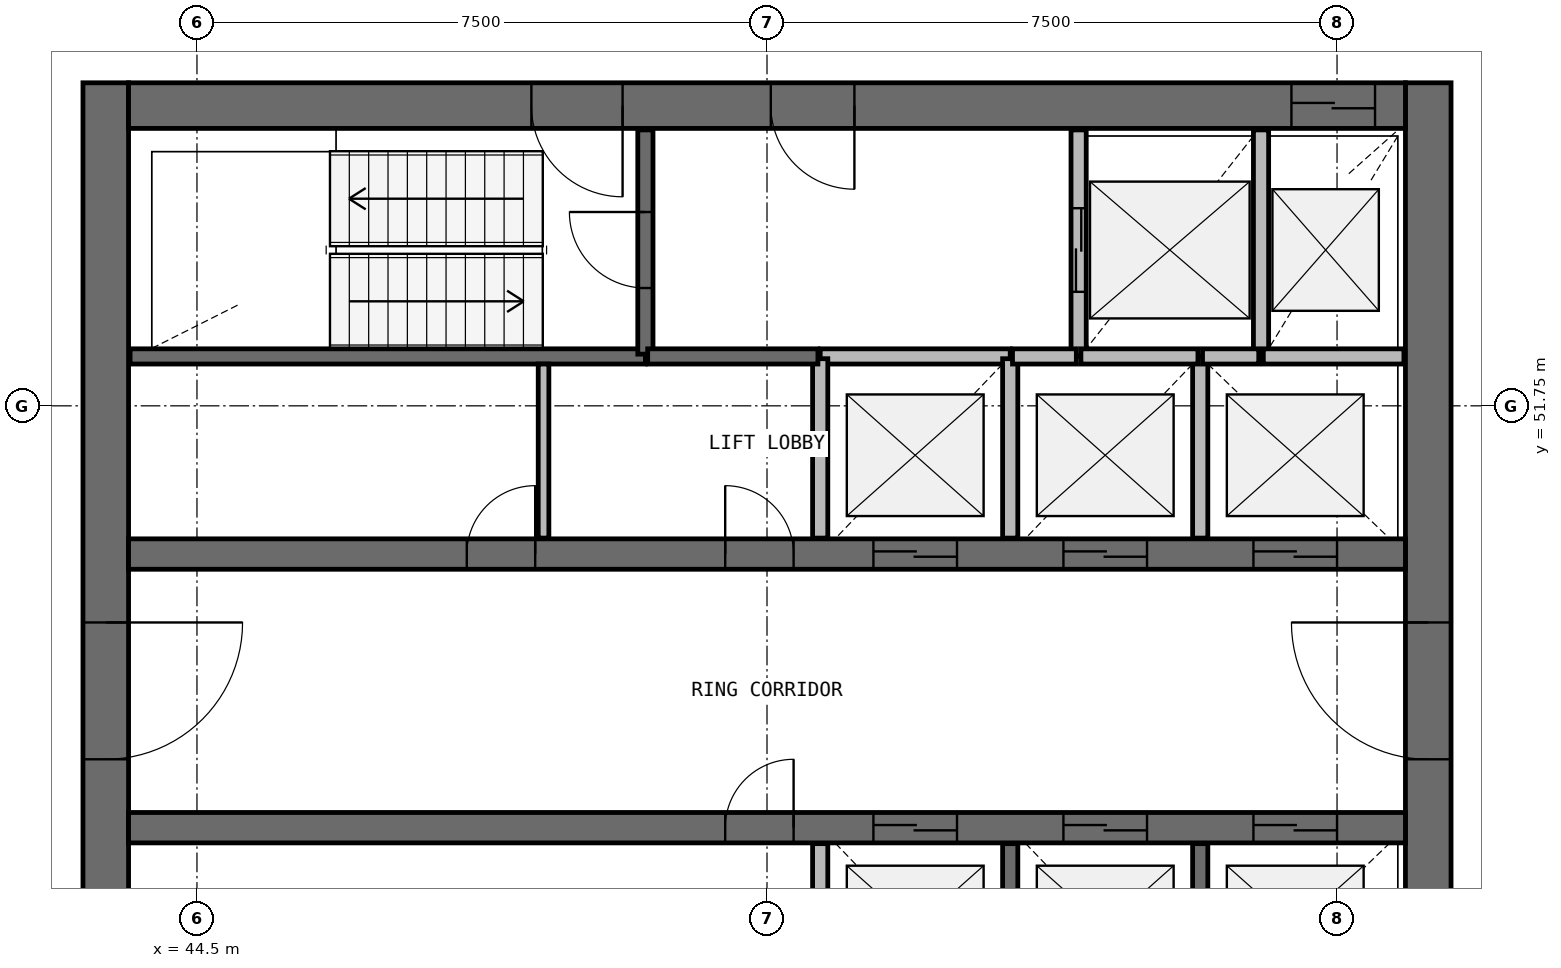
"""IFC4 building model, lengths in metres.
Left out: names, types, materials, properties, quantities, classifications, styles, units other than length and angle.
Written with IfcOpenShell. Run it as: python <this file> out.ifc"""

import sys

from ifc_helpers import new_model, si_unit, direction, frame, frame_2d, origin, place, context, subcontext, project, spatial, rectangle, extrude, source, transform, mapped, element, fill, save


model = new_model("IFC4")
c1 = context("Model", 3, precision=1e-05, world=origin(), true_north=direction((0.0, 1.0)))
c2 = subcontext(c1, "Body", "Model", "MODEL_VIEW")
j1 = project(units=[si_unit("LENGTHUNIT", "METRE"), si_unit("PLANEANGLEUNIT", "RADIAN")], contexts=[c1])
p1 = place(None, origin())
s1 = spatial("IfcSite", under=j1, at=p1, CompositionType="ELEMENT")
p2 = place(p1, origin())
s2 = spatial("IfcBuilding", under=s1, at=p2, CompositionType="ELEMENT")
p3 = place(p2, frame((0.0, 0.0, 257.9)))
s3 = spatial("IfcBuildingStorey", under=s2, at=p3, CompositionType="ELEMENT", Elevation=257.9)
p4 = place(p3, frame((60.7, 40.0, 0.0), z_axis=(0.0, 0.0, 1.0), x_axis=(0.0, 1.0, 0.0)))
e1 = element("IfcWall", 1, at=p4, inside=s3, PredefinedType="SHEAR", context=c2, shape_type="SweptSolid", body=[
    extrude(rectangle(XDim=16.0, YDim=0.6, at=frame_2d((8.0, 0.0))), origin(), (0.0, 0.0, 1.0), 3.9),
])
p5 = place(p4, frame((7.1, 0.0, 0.0)))
e2 = element("IfcOpeningElement", 2, at=p5, cuts=e1, PredefinedType="OPENING", context=c2, shape_type="SweptSolid", body=[
    extrude(rectangle(XDim=1.8, YDim=2.1, at=frame_2d((0.9, 1.05))), frame((0.0, 0.31, 0.0), z_axis=(0.0, -1.0, 0.0), x_axis=(1.0, 0.0, 0.0)), (0.0, 0.0, 1.0), 0.62),
])
p6 = place(p3, frame((43.3, 56.0, 0.0), z_axis=(0.0, 0.0, 1.0), x_axis=(0.0, -1.0, 0.0)))
e3 = element("IfcWall", 3, at=p6, inside=s3, PredefinedType="SHEAR", context=c2, shape_type="SweptSolid", body=[
    extrude(rectangle(XDim=16.0, YDim=0.6, at=frame_2d((8.0, 0.0))), origin(), (0.0, 0.0, 1.0), 3.9),
])
p7 = place(p6, frame((7.1, 0.0, 0.0)))
e4 = element("IfcOpeningElement", 4, at=p7, cuts=e3, PredefinedType="OPENING", context=c2, shape_type="SweptSolid", body=[
    extrude(rectangle(XDim=1.8, YDim=2.1, at=frame_2d((0.9, 1.05))), frame((0.0, 0.31, 0.0), z_axis=(0.0, -1.0, 0.0), x_axis=(1.0, 0.0, 0.0)), (0.0, 0.0, 1.0), 0.62),
])
p8 = place(p3, frame((60.4, 55.7, 0.0), z_axis=(0.0, 0.0, 1.0), x_axis=(-1.0, 0.0, 0.0)))
e5 = element("IfcWall", 5, at=p8, inside=s3, PredefinedType="SHEAR", context=c2, shape_type="SweptSolid", body=[
    extrude(rectangle(XDim=16.8, YDim=0.6, at=frame_2d((8.4, 0.0))), origin(), (0.0, 0.0, 1.0), 3.9),
])
p9 = place(p8, frame((0.4, 0.0, 0.0)))
e6 = element("IfcOpeningElement", 6, at=p9, cuts=e5, PredefinedType="OPENING", context=c2, shape_type="SweptSolid", body=[
    extrude(rectangle(XDim=1.1, YDim=2.1, at=frame_2d((0.55, 1.05))), frame((0.0, 0.31, 0.0), z_axis=(0.0, -1.0, 0.0), x_axis=(1.0, 0.0, 0.0)), (0.0, 0.0, 1.0), 0.62),
])
p10 = place(p8, frame((10.3, 0.0, 0.0)))
e7 = element("IfcOpeningElement", 7, at=p10, cuts=e5, PredefinedType="OPENING", context=c2, shape_type="SweptSolid", body=[
    extrude(rectangle(XDim=1.2, YDim=2.1, at=frame_2d((0.6, 1.05))), frame((0.0, 0.31, 0.0), z_axis=(0.0, -1.0, 0.0), x_axis=(1.0, 0.0, 0.0)), (0.0, 0.0, 1.0), 0.62),
])
p11 = place(p8, frame((7.25, 0.0, 0.0)))
e8 = element("IfcOpeningElement", 8, at=p11, cuts=e5, PredefinedType="OPENING", context=c2, shape_type="SweptSolid", body=[
    extrude(rectangle(XDim=1.1, YDim=2.1, at=frame_2d((0.55, 1.05))), frame((0.0, 0.31, 0.0), z_axis=(0.0, -1.0, 0.0), x_axis=(1.0, 0.0, 0.0)), (0.0, 0.0, 1.0), 0.62),
])
p12 = place(p3, frame((43.6, 49.8, 0.0), z_axis=(0.0, 0.0, 1.0), x_axis=(1.0, 0.0, 0.0)))
e9 = element("IfcWall", 9, at=p12, inside=s3, PredefinedType="SHEAR", context=c2, shape_type="SweptSolid", body=[
    extrude(rectangle(XDim=16.8, YDim=0.4, at=frame_2d((8.4, 0.0))), origin(), (0.0, 0.0, 1.0), 3.9),
])
p13 = place(p12, frame((9.8, 0.0, 0.0)))
e10 = element("IfcOpeningElement", 10, at=p13, cuts=e9, PredefinedType="OPENING", context=c2, shape_type="SweptSolid", body=[
    extrude(rectangle(XDim=1.1, YDim=2.1, at=frame_2d((0.55, 1.05))), frame((0.0, 0.21, 0.0), z_axis=(0.0, -1.0, 0.0), x_axis=(1.0, 0.0, 0.0)), (0.0, 0.0, 1.0), 0.42),
])
p14 = place(p12, frame((12.3, 0.0, 0.0)))
e11 = element("IfcOpeningElement", 11, at=p14, cuts=e9, PredefinedType="OPENING", context=c2, shape_type="SweptSolid", body=[
    extrude(rectangle(XDim=1.1, YDim=2.1, at=frame_2d((0.55, 1.05))), frame((0.0, 0.21, 0.0), z_axis=(0.0, -1.0, 0.0), x_axis=(1.0, 0.0, 0.0)), (0.0, 0.0, 1.0), 0.42),
])
p15 = place(p12, frame((14.8, 0.0, 0.0)))
e12 = element("IfcOpeningElement", 12, at=p15, cuts=e9, PredefinedType="OPENING", context=c2, shape_type="SweptSolid", body=[
    extrude(rectangle(XDim=1.1, YDim=2.1, at=frame_2d((0.55, 1.05))), frame((0.0, 0.21, 0.0), z_axis=(0.0, -1.0, 0.0), x_axis=(1.0, 0.0, 0.0)), (0.0, 0.0, 1.0), 0.42),
])
p16 = place(p12, frame((4.45, 0.0, 0.0)))
e13 = element("IfcOpeningElement", 13, at=p16, cuts=e9, PredefinedType="OPENING", context=c2, shape_type="SweptSolid", body=[
    extrude(rectangle(XDim=0.9, YDim=2.1, at=frame_2d((0.45, 1.05))), frame((0.0, 0.21, 0.0), z_axis=(0.0, -1.0, 0.0), x_axis=(1.0, 0.0, 0.0)), (0.0, 0.0, 1.0), 0.42),
])
p17 = place(p12, frame((7.85, 0.0, 0.0)))
e14 = element("IfcOpeningElement", 14, at=p17, cuts=e9, PredefinedType="OPENING", context=c2, shape_type="SweptSolid", body=[
    extrude(rectangle(XDim=0.9, YDim=2.1, at=frame_2d((0.45, 1.05))), frame((0.0, 0.21, 0.0), z_axis=(0.0, -1.0, 0.0), x_axis=(1.0, 0.0, 0.0)), (0.0, 0.0, 1.0), 0.42),
])
p18 = place(p3, frame((43.6, 46.2, 0.0), z_axis=(0.0, 0.0, 1.0), x_axis=(1.0, 0.0, 0.0)))
e15 = element("IfcWall", 15, at=p18, inside=s3, PredefinedType="SHEAR", context=c2, shape_type="SweptSolid", body=[
    extrude(rectangle(XDim=16.8, YDim=0.4, at=frame_2d((8.4, 0.0))), origin(), (0.0, 0.0, 1.0), 3.9),
])
p19 = place(p18, frame((9.8, 0.0, 0.0)))
e16 = element("IfcOpeningElement", 16, at=p19, cuts=e15, PredefinedType="OPENING", context=c2, shape_type="SweptSolid", body=[
    extrude(rectangle(XDim=1.1, YDim=2.1, at=frame_2d((0.55, 1.05))), frame((0.0, 0.21, 0.0), z_axis=(0.0, -1.0, 0.0), x_axis=(1.0, 0.0, 0.0)), (0.0, 0.0, 1.0), 0.42),
])
p20 = place(p18, frame((12.3, 0.0, 0.0)))
e17 = element("IfcOpeningElement", 17, at=p20, cuts=e15, PredefinedType="OPENING", context=c2, shape_type="SweptSolid", body=[
    extrude(rectangle(XDim=1.1, YDim=2.1, at=frame_2d((0.55, 1.05))), frame((0.0, 0.21, 0.0), z_axis=(0.0, -1.0, 0.0), x_axis=(1.0, 0.0, 0.0)), (0.0, 0.0, 1.0), 0.42),
])
p21 = place(p18, frame((14.8, 0.0, 0.0)))
e18 = element("IfcOpeningElement", 18, at=p21, cuts=e15, PredefinedType="OPENING", context=c2, shape_type="SweptSolid", body=[
    extrude(rectangle(XDim=1.1, YDim=2.1, at=frame_2d((0.55, 1.05))), frame((0.0, 0.21, 0.0), z_axis=(0.0, -1.0, 0.0), x_axis=(1.0, 0.0, 0.0)), (0.0, 0.0, 1.0), 0.42),
])
p22 = place(p18, frame((7.85, 0.0, 0.0)))
e19 = element("IfcOpeningElement", 19, at=p22, cuts=e15, PredefinedType="OPENING", context=c2, shape_type="SweptSolid", body=[
    extrude(rectangle(XDim=0.9, YDim=2.1, at=frame_2d((0.45, 1.05))), frame((0.0, 0.21, 0.0), z_axis=(0.0, -1.0, 0.0), x_axis=(1.0, 0.0, 0.0)), (0.0, 0.0, 1.0), 0.42),
])
p23 = place(p3, frame((43.62, 52.4, 0.0), z_axis=(0.0, 0.0, 1.0), x_axis=(1.0, 0.0, 0.0)))
e20 = element("IfcWall", 20, at=p23, inside=s3, PredefinedType="SOLIDWALL", context=c2, shape_type="SweptSolid", body=[
    extrude(rectangle(XDim=6.78, YDim=0.2, at=frame_2d((3.39, 0.0))), origin(), (0.0, 0.0, 1.0), 3.58),
])
p24 = place(p3, frame((50.4, 52.43, 0.0), z_axis=(0.0, 0.0, 1.0), x_axis=(0.0, 1.0, 0.0)))
e21 = element("IfcWall", 21, at=p24, inside=s3, PredefinedType="SOLIDWALL", context=c2, shape_type="SweptSolid", body=[
    extrude(rectangle(XDim=2.95, YDim=0.2, at=frame_2d((1.475, 0.0))), origin(), (0.0, 0.0, 1.0), 3.58),
])
p25 = place(p24, frame((0.87, 0.0, 0.0)))
e22 = element("IfcOpeningElement", 22, at=p25, cuts=e21, PredefinedType="OPENING", context=c2, shape_type="SweptSolid", body=[
    extrude(rectangle(XDim=1.0, YDim=2.1, at=frame_2d((0.5, 1.05))), frame((0.0, 0.11, 0.0), z_axis=(0.0, -1.0, 0.0), x_axis=(1.0, 0.0, 0.0)), (0.0, 0.0, 1.0), 0.22),
])
p26 = place(p3, frame((56.1, 55.38, 0.0), z_axis=(0.0, 0.0, 1.0), x_axis=(0.0, -1.0, 0.0)))
e23 = element("IfcWall", 23, at=p26, inside=s3, PredefinedType="SOLIDWALL", context=c2, shape_type="SweptSolid", body=[
    extrude(rectangle(XDim=2.98, YDim=0.2, at=frame_2d((1.49, 0.0))), origin(), (0.0, 0.0, 1.0), 3.58),
])
p27 = place(p26, frame((1.03, 0.0, 0.0)))
e24 = element("IfcOpeningElement", 24, at=p27, cuts=e23, PredefinedType="OPENING", context=c2, shape_type="SweptSolid", body=[
    extrude(rectangle(XDim=1.1, YDim=2.1, at=frame_2d((0.55, 1.05))), frame((0.0, 0.11, 0.0), z_axis=(0.0, -1.0, 0.0), x_axis=(1.0, 0.0, 0.0)), (0.0, 0.0, 1.0), 0.22),
])
p28 = place(p3, frame((58.5, 52.4, 0.0), z_axis=(0.0, 0.0, 1.0), x_axis=(0.0, 1.0, 0.0)))
e25 = element("IfcWall", 25, at=p28, inside=s3, PredefinedType="SOLIDWALL", context=c2, shape_type="SweptSolid", body=[
    extrude(rectangle(XDim=2.98, YDim=0.2, at=frame_2d((1.49, 0.0))), origin(), (0.0, 0.0, 1.0), 3.58),
])
p29 = place(p3, frame((55.2, 52.4, 0.0), z_axis=(0.0, 0.0, 1.0), x_axis=(-1.0, 0.0, 0.0)))
e26 = element("IfcWall", 26, at=p29, inside=s3, PredefinedType="SOLIDWALL", context=c2, shape_type="SweptSolid", body=[
    extrude(rectangle(XDim=2.5, YDim=0.2, at=frame_2d((1.25, 0.0))), origin(), (0.0, 0.0, 1.0), 3.58),
])
for number, where, z_axis, x_axis in (
    (27, (52.7, 45.99, 0.0), (0.0, 0.0, 1.0), (0.0, -1.0, 0.0)),
    (28, (52.7, 52.37, 0.0), (0.0, 0.0, 1.0), (0.0, -1.0, 0.0)),
    (29, (55.2, 43.63, 0.0), (0.0, 0.0, 1.0), (0.0, 1.0, 0.0)),
    (30, (55.2, 50.01, 0.0), (0.0, 0.0, 1.0), (0.0, 1.0, 0.0)),
    (31, (57.7, 43.63, 0.0), (0.0, 0.0, 1.0), (0.0, 1.0, 0.0)),
):
    element("IfcWall", number, at=place(p3, frame(where, z_axis=z_axis, x_axis=x_axis)), inside=s3, PredefinedType="SOLIDWALL", context=c2, shape_type="SweptSolid", body=[
        extrude(rectangle(XDim=2.36, YDim=0.2, at=frame_2d((1.18, 0.0))), origin(), (0.0, 0.0, 1.0), 3.58),
    ])
p30 = place(p3, frame((57.7, 50.01, 0.0), z_axis=(0.0, 0.0, 1.0), x_axis=(0.0, 1.0, 0.0)))
e32 = element("IfcWall", 32, at=p30, inside=s3, PredefinedType="SOLIDWALL", context=c2, shape_type="SweptSolid", body=[
    extrude(rectangle(XDim=2.39, YDim=0.2, at=frame_2d((1.195, 0.0))), origin(), (0.0, 0.0, 1.0), 3.58),
])
p31 = place(p3, frame((50.43, 52.4, 0.0), z_axis=(0.0, 0.0, 1.0), x_axis=(1.0, 0.0, 0.0)))
e33 = element("IfcWall", 33, at=p31, inside=s3, PredefinedType="SOLIDWALL", context=c2, shape_type="SweptSolid", body=[
    extrude(rectangle(XDim=2.24, YDim=0.2, at=frame_2d((1.12, 0.0))), origin(), (0.0, 0.0, 1.0), 3.58),
])
p32 = place(p3, frame((60.38, 52.4, 0.0), z_axis=(0.0, 0.0, 1.0), x_axis=(-1.0, 0.0, 0.0)))
e34 = element("IfcWall", 34, at=p32, inside=s3, PredefinedType="SOLIDWALL", context=c2, shape_type="SweptSolid", body=[
    extrude(rectangle(XDim=1.85, YDim=0.2, at=frame_2d((0.925, 0.0))), origin(), (0.0, 0.0, 1.0), 3.58),
])
p33 = place(p3, frame((57.67, 52.4, 0.0), z_axis=(0.0, 0.0, 1.0), x_axis=(-1.0, 0.0, 0.0)))
e35 = element("IfcWall", 35, at=p33, inside=s3, PredefinedType="SOLIDWALL", context=c2, shape_type="SweptSolid", body=[
    extrude(rectangle(XDim=1.54, YDim=0.2, at=frame_2d((0.77, 0.0))), origin(), (0.0, 0.0, 1.0), 3.58),
])
p34 = place(p3, frame((56.07, 52.4, 0.0), z_axis=(0.0, 0.0, 1.0), x_axis=(-1.0, 0.0, 0.0)))
e36 = element("IfcWall", 36, at=p34, inside=s3, PredefinedType="SOLIDWALL", context=c2, shape_type="SweptSolid", body=[
    extrude(rectangle(XDim=0.84, YDim=0.2, at=frame_2d((0.42, 0.0))), origin(), (0.0, 0.0, 1.0), 3.58),
])
p35 = place(p3, frame((58.47, 52.4, 0.0), z_axis=(0.0, 0.0, 1.0), x_axis=(-1.0, 0.0, 0.0)))
e37 = element("IfcWall", 37, at=p35, inside=s3, PredefinedType="SOLIDWALL", context=c2, shape_type="SweptSolid", body=[
    extrude(rectangle(XDim=0.74, YDim=0.2, at=frame_2d((0.37, 0.0))), origin(), (0.0, 0.0, 1.0), 3.58),
])
p36 = place(p3, frame((49.06, 50.01, 0.0), z_axis=(0.0, 0.0, 1.0), x_axis=(0.0, 1.0, 0.0)))
e38 = element("IfcWall", 38, at=p36, inside=s3, PredefinedType="PARTITIONING", context=c2, shape_type="SweptSolid", body=[
    extrude(rectangle(XDim=2.29, YDim=0.14, at=frame_2d((1.145, 0.0))), origin(), (0.0, 0.0, 1.0), 2.88),
])
m1 = source(origin(), c2, "Body", "SweptSolid", [
    extrude(rectangle(XDim=1.8, YDim=2.1, at=frame_2d((0.9, 1.05))), frame((0.0, 0.025, 0.0), z_axis=(0.0, -1.0, 0.0), x_axis=(1.0, 0.0, 0.0)), (0.0, 0.0, 1.0), 0.05),
])
p37 = place(p7, origin())
e39 = element("IfcDoor", 39, at=p37, inside=s3, OperationType="SINGLE_SWING_LEFT", PredefinedType="DOOR", context=c2, shape_type="MappedRepresentation", body=[
    mapped(m1, transform((0.0, 0.0, 0.0), scale=1.0)),
])
fill(e4, e39)
p38 = place(p5, origin())
e40 = element("IfcDoor", 40, at=p38, inside=s3, OperationType="SINGLE_SWING_RIGHT", PredefinedType="DOOR", context=c2, shape_type="MappedRepresentation", body=[
    mapped(m1, transform((0.0, 0.0, 0.0), scale=1.0)),
])
fill(e2, e40)
m2 = source(origin(), c2, "Body", "SweptSolid", [
    extrude(rectangle(XDim=1.1, YDim=2.1, at=frame_2d((0.55, 1.05))), frame((0.0, 0.025, 0.0), z_axis=(0.0, -1.0, 0.0), x_axis=(1.0, 0.0, 0.0)), (0.0, 0.0, 1.0), 0.05),
])
p39 = place(p13, origin())
e41 = element("IfcDoor", 41, at=p39, inside=s3, OperationType="DOUBLE_DOOR_SLIDING", PredefinedType="USERDEFINED", context=c2, shape_type="MappedRepresentation", body=[
    mapped(m2, transform((0.0, 0.0, 0.0), scale=1.0)),
])
fill(e10, e41)
p40 = place(p14, origin())
e42 = element("IfcDoor", 42, at=p40, inside=s3, OperationType="DOUBLE_DOOR_SLIDING", PredefinedType="USERDEFINED", context=c2, shape_type="MappedRepresentation", body=[
    mapped(m2, transform((0.0, 0.0, 0.0), scale=1.0)),
])
fill(e11, e42)
p41 = place(p15, origin())
e43 = element("IfcDoor", 43, at=p41, inside=s3, OperationType="DOUBLE_DOOR_SLIDING", PredefinedType="USERDEFINED", context=c2, shape_type="MappedRepresentation", body=[
    mapped(m2, transform((0.0, 0.0, 0.0), scale=1.0)),
])
fill(e12, e43)
p42 = place(p19, origin())
e44 = element("IfcDoor", 44, at=p42, inside=s3, OperationType="DOUBLE_DOOR_SLIDING", PredefinedType="USERDEFINED", context=c2, shape_type="MappedRepresentation", body=[
    mapped(m2, transform((0.0, 0.0, 0.0), scale=1.0)),
])
fill(e16, e44)
p43 = place(p20, origin())
e45 = element("IfcDoor", 45, at=p43, inside=s3, OperationType="DOUBLE_DOOR_SLIDING", PredefinedType="USERDEFINED", context=c2, shape_type="MappedRepresentation", body=[
    mapped(m2, transform((0.0, 0.0, 0.0), scale=1.0)),
])
fill(e17, e45)
p44 = place(p21, origin())
e46 = element("IfcDoor", 46, at=p44, inside=s3, OperationType="DOUBLE_DOOR_SLIDING", PredefinedType="USERDEFINED", context=c2, shape_type="MappedRepresentation", body=[
    mapped(m2, transform((0.0, 0.0, 0.0), scale=1.0)),
])
fill(e18, e46)
p45 = place(p27, origin())
e47 = element("IfcDoor", 47, at=p45, inside=s3, OperationType="DOUBLE_DOOR_SLIDING", PredefinedType="USERDEFINED", context=c2, shape_type="MappedRepresentation", body=[
    mapped(m2, transform((0.0, 0.0, 0.0), scale=1.0)),
])
fill(e24, e47)
p46 = place(p9, origin())
e48 = element("IfcDoor", 48, at=p46, inside=s3, OperationType="DOUBLE_DOOR_SLIDING", PredefinedType="USERDEFINED", context=c2, shape_type="MappedRepresentation", body=[
    mapped(m2, transform((0.0, 0.0, 0.0), scale=1.0)),
])
fill(e6, e48)
m3 = source(origin(), c2, "Body", "SweptSolid", [
    extrude(rectangle(XDim=1.2, YDim=2.1, at=frame_2d((0.6, 1.05))), frame((0.0, 0.025, 0.0), z_axis=(0.0, -1.0, 0.0), x_axis=(1.0, 0.0, 0.0)), (0.0, 0.0, 1.0), 0.05),
])
p47 = place(p10, origin())
e49 = element("IfcDoor", 49, at=p47, inside=s3, OperationType="SINGLE_SWING_LEFT", PredefinedType="DOOR", context=c2, shape_type="MappedRepresentation", body=[
    mapped(m3, transform((0.0, 0.0, 0.0), scale=1.0)),
])
fill(e7, e49)
m4 = source(origin(), c2, "Body", "SweptSolid", [
    extrude(rectangle(XDim=1.0, YDim=2.1, at=frame_2d((0.5, 1.05))), frame((0.0, 0.025, 0.0), z_axis=(0.0, -1.0, 0.0), x_axis=(1.0, 0.0, 0.0)), (0.0, 0.0, 1.0), 0.05),
])
p48 = place(p25, origin())
e50 = element("IfcDoor", 50, at=p48, inside=s3, OperationType="SINGLE_SWING_RIGHT", PredefinedType="DOOR", context=c2, shape_type="MappedRepresentation", body=[
    mapped(m4, transform((0.0, 0.0, 0.0), scale=1.0)),
])
fill(e22, e50)
m5 = source(origin(), c2, "Body", "SweptSolid", [
    extrude(rectangle(XDim=1.1, YDim=2.1, at=frame_2d((0.55, 1.05))), frame((0.0, 0.025, 0.0), z_axis=(0.0, -1.0, 0.0), x_axis=(1.0, 0.0, 0.0)), (0.0, 0.0, 1.0), 0.05),
])
p49 = place(p11, origin())
e51 = element("IfcDoor", 51, at=p49, inside=s3, OperationType="SINGLE_SWING_LEFT", PredefinedType="DOOR", context=c2, shape_type="MappedRepresentation", body=[
    mapped(m5, transform((0.0, 0.0, 0.0), scale=1.0)),
])
fill(e8, e51)
m6 = source(origin(), c2, "Body", "SweptSolid", [
    extrude(rectangle(XDim=0.9, YDim=2.1, at=frame_2d((0.45, 1.05))), frame((0.0, 0.025, 0.0), z_axis=(0.0, -1.0, 0.0), x_axis=(1.0, 0.0, 0.0)), (0.0, 0.0, 1.0), 0.05),
])
p50 = place(p16, origin())
e52 = element("IfcDoor", 52, at=p50, inside=s3, OperationType="SINGLE_SWING_RIGHT", PredefinedType="DOOR", context=c2, shape_type="MappedRepresentation", body=[
    mapped(m6, transform((0.0, 0.0, 0.0), scale=1.0)),
])
fill(e13, e52)
p51 = place(p17, origin())
e53 = element("IfcDoor", 53, at=p51, inside=s3, OperationType="SINGLE_SWING_LEFT", PredefinedType="DOOR", context=c2, shape_type="MappedRepresentation", body=[
    mapped(m6, transform((0.0, 0.0, 0.0), scale=1.0)),
])
fill(e14, e53)
p52 = place(p22, origin())
e54 = element("IfcDoor", 54, at=p52, inside=s3, OperationType="SINGLE_SWING_RIGHT", PredefinedType="DOOR", context=c2, shape_type="MappedRepresentation", body=[
    mapped(m6, transform((0.0, 0.0, 0.0), scale=1.0)),
])
fill(e19, e54)
save(model, sys.argv[1])
